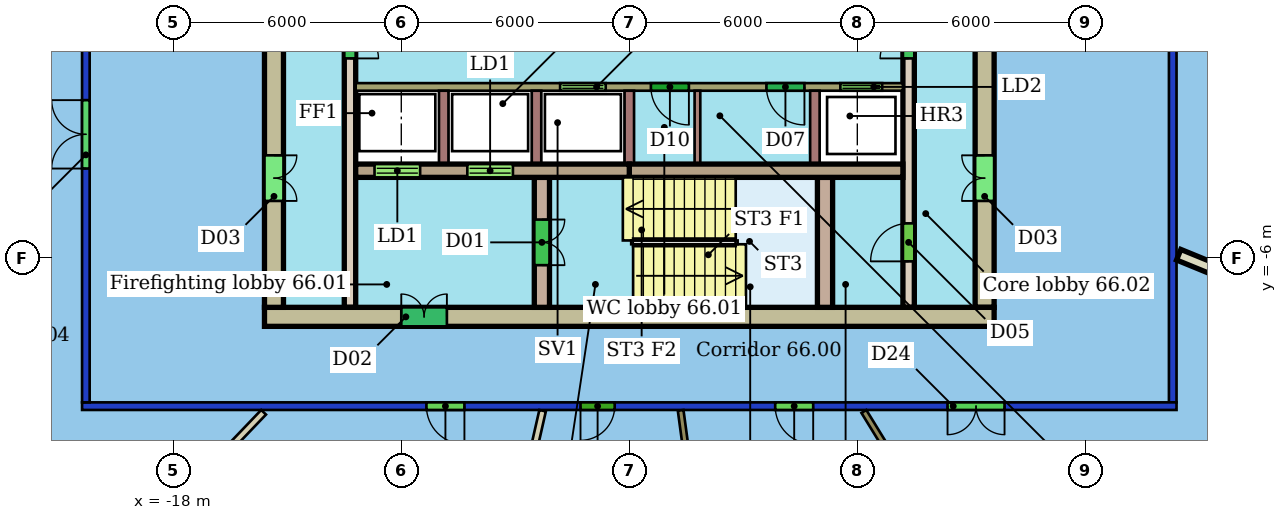
"""IFC4 building model, lengths in metres.
Left out: names, types, materials, properties, quantities, classifications, styles, units other than length and angle.
Written with IfcOpenShell. Run it as: python <this file> out.ifc"""

import sys

from ifc_helpers import new_model, si_unit, direction, frame, frame_2d, origin, place, context, subcontext, project, spatial, rectangle, extrude, element, fill, save


model = new_model("IFC4")
c1 = context("Model", 3, precision=1e-05, world=origin(), true_north=direction((0.0, 1.0)))
c2 = subcontext(c1, "Body", "Model", "MODEL_VIEW")
j1 = project(units=[si_unit("LENGTHUNIT", "METRE"), si_unit("PLANEANGLEUNIT", "RADIAN")], contexts=[c1])
p1 = place(None, origin())
s1 = spatial("IfcSite", under=j1, at=p1, CompositionType="ELEMENT")
p2 = place(p1, origin())
s2 = spatial("IfcBuilding", under=s1, at=p2, CompositionType="ELEMENT")
p3 = place(p2, frame((0.0, 0.0, 268.5)))
s3 = spatial("IfcBuildingStorey", under=s2, at=p3, CompositionType="ELEMENT", Elevation=268.5)
p4 = place(p3, frame((8.4, -9.9, 0.0), z_axis=(0.0, 0.0, 1.0), x_axis=(-1.0, 0.0, 0.0)))
e1 = element("IfcWall", 1, at=p4, inside=s3, PredefinedType="PARTITIONING", context=c2, shape_type="SweptSolid", body=[
    extrude(rectangle(XDim=28.8, YDim=0.2, at=frame_2d((14.4, 0.0))), origin(), (0.0, 0.0, 1.0), 3.1),
])
p5 = place(p4, frame((18.739, 0.0, 0.0)))
e2 = element("IfcOpeningElement", 2, at=p5, cuts=e1, PredefinedType="OPENING", context=c2, shape_type="SweptSolid", body=[
    extrude(rectangle(XDim=1.0, YDim=2.1, at=frame_2d((0.5, 1.05))), frame((0.0, 0.11, 0.0), z_axis=(0.0, -1.0, 0.0), x_axis=(1.0, 0.0, 0.0)), (0.0, 0.0, 1.0), 0.22),
])
p6 = place(p4, frame((14.784, 0.0, 0.0)))
e3 = element("IfcOpeningElement", 3, at=p6, cuts=e1, PredefinedType="OPENING", context=c2, shape_type="SweptSolid", body=[
    extrude(rectangle(XDim=0.9, YDim=2.1, at=frame_2d((0.45, 1.05))), frame((0.0, 0.11, 0.0), z_axis=(0.0, -1.0, 0.0), x_axis=(1.0, 0.0, 0.0)), (0.0, 0.0, 1.0), 0.22),
])
p7 = place(p4, frame((9.561, 0.0, 0.0)))
e4 = element("IfcOpeningElement", 4, at=p7, cuts=e1, PredefinedType="OPENING", context=c2, shape_type="SweptSolid", body=[
    extrude(rectangle(XDim=1.0, YDim=2.1, at=frame_2d((0.5, 1.05))), frame((0.0, 0.11, 0.0), z_axis=(0.0, -1.0, 0.0), x_axis=(1.0, 0.0, 0.0)), (0.0, 0.0, 1.0), 0.22),
])
p8 = place(p4, frame((4.526, 0.0, 0.0)))
e5 = element("IfcOpeningElement", 5, at=p8, cuts=e1, PredefinedType="OPENING", context=c2, shape_type="SweptSolid", body=[
    extrude(rectangle(XDim=1.5, YDim=2.1, at=frame_2d((0.75, 1.05))), frame((0.0, 0.11, 0.0), z_axis=(0.0, -1.0, 0.0), x_axis=(1.0, 0.0, 0.0)), (0.0, 0.0, 1.0), 0.22),
])
p9 = place(p3, frame((-20.3, -9.8, 0.0), z_axis=(0.0, 0.0, 1.0), x_axis=(0.0, 1.0, 0.0)))
e6 = element("IfcWall", 6, at=p9, inside=s3, PredefinedType="PARTITIONING", context=c2, shape_type="SweptSolid", body=[
    extrude(rectangle(XDim=19.6, YDim=0.2, at=frame_2d((9.8, 0.0))), origin(), (0.0, 0.0, 1.0), 3.1),
])
p10 = place(p9, frame((13.312, 0.0, 0.0)))
e7 = element("IfcOpeningElement", 7, at=p10, cuts=e6, PredefinedType="OPENING", context=c2, shape_type="SweptSolid", body=[
    extrude(rectangle(XDim=1.5, YDim=2.4, at=frame_2d((0.75, 1.2))), frame((0.0, 0.11, 0.0), z_axis=(0.0, -1.0, 0.0), x_axis=(1.0, 0.0, 0.0)), (0.0, 0.0, 1.0), 0.22),
])
p11 = place(p9, frame((6.152, 0.0, 0.0)))
e8 = element("IfcOpeningElement", 8, at=p11, cuts=e6, PredefinedType="OPENING", context=c2, shape_type="SweptSolid", body=[
    extrude(rectangle(XDim=1.8, YDim=2.1, at=frame_2d((0.9, 1.05))), frame((0.0, 0.11, 0.0), z_axis=(0.0, -1.0, 0.0), x_axis=(1.0, 0.0, 0.0)), (0.0, 0.0, 1.0), 0.22),
])
p12 = place(p3, frame((8.3, 9.8, 0.0), z_axis=(0.0, 0.0, 1.0), x_axis=(0.0, -1.0, 0.0)))
e9 = element("IfcWall", 9, at=p12, inside=s3, PredefinedType="PARTITIONING", context=c2, shape_type="SweptSolid", body=[
    extrude(rectangle(XDim=19.6, YDim=0.2, at=frame_2d((9.8, 0.0))), origin(), (0.0, 0.0, 1.0), 3.1),
])
p13 = place(p12, frame((7.671, 0.0, 0.0)))
e10 = element("IfcOpeningElement", 10, at=p13, cuts=e9, PredefinedType="OPENING", context=c2, shape_type="SweptSolid", body=[
    extrude(rectangle(XDim=1.8, YDim=2.4, at=frame_2d((0.9, 1.2))), frame((0.0, 0.11, 0.0), z_axis=(0.0, -1.0, 0.0), x_axis=(1.0, 0.0, 0.0)), (0.0, 0.0, 1.0), 0.22),
])
p14 = place(p12, frame((2.344, 0.0, 0.0)))
e11 = element("IfcOpeningElement", 11, at=p14, cuts=e9, PredefinedType="OPENING", context=c2, shape_type="SweptSolid", body=[
    extrude(rectangle(XDim=1.0, YDim=2.4, at=frame_2d((0.5, 1.2))), frame((0.0, 0.11, 0.0), z_axis=(0.0, -1.0, 0.0), x_axis=(1.0, 0.0, 0.0)), (0.0, 0.0, 1.0), 0.22),
])
p15 = place(p3, frame((-23.423, -18.215, 0.0), z_axis=(0.0, 0.0, 1.0), x_axis=(0.691235418305, 0.722629639913, 0.0)))
e12 = element("IfcWall", 12, at=p15, inside=s3, PredefinedType="PARTITIONING", context=c2, shape_type="SweptSolid", body=[
    extrude(rectangle(XDim=11.284, YDim=0.175, at=frame_2d((5.642, 0.0))), origin(), (0.0, 0.0, 1.0), 3.45),
])
p16 = place(p3, frame((-11.521, -24.243, 0.0), z_axis=(0.0, 0.0, 1.0), x_axis=(0.222039917011, 0.975037576329, 0.0)))
e13 = element("IfcWall", 13, at=p16, inside=s3, PredefinedType="PARTITIONING", context=c2, shape_type="SweptSolid", body=[
    extrude(rectangle(XDim=14.588, YDim=0.175, at=frame_2d((7.294, 0.0))), origin(), (0.0, 0.0, 1.0), 3.45),
])
p17 = place(p3, frame((-2.887, -23.066, 0.0), z_axis=(0.0, 0.0, 1.0), x_axis=(-0.133760987358, 0.991013621632, 0.0)))
e14 = element("IfcWall", 14, at=p17, inside=s3, PredefinedType="PARTITIONING", context=c2, shape_type="SweptSolid", body=[
    extrude(rectangle(XDim=13.174, YDim=0.15, at=frame_2d((6.587, 0.0))), origin(), (0.0, 0.0, 1.0), 3.45),
])
p18 = place(p3, frame((5.294, -18.369, 0.0), z_axis=(0.0, 0.0, 1.0), x_axis=(-0.523770006644, 0.851859718581, 0.0)))
e15 = element("IfcWall", 15, at=p18, inside=s3, PredefinedType="PARTITIONING", context=c2, shape_type="SweptSolid", body=[
    extrude(rectangle(XDim=9.778, YDim=0.15, at=frame_2d((4.889, 0.0))), origin(), (0.0, 0.0, 1.0), 3.45),
])
p19 = place(p3, frame((13.344, -7.915, 0.0), z_axis=(0.0, 0.0, 1.0), x_axis=(-0.925520438103, 0.378697661274, 0.0)))
e16 = element("IfcWall", 16, at=p19, inside=s3, PredefinedType="PARTITIONING", context=c2, shape_type="SweptSolid", body=[
    extrude(rectangle(XDim=5.28, YDim=0.3, at=frame_2d((2.64, 0.0))), origin(), (0.0, 0.0, 1.0), 3.45),
])
p20 = place(p3, frame((-15.6, -7.55, 0.0), z_axis=(0.0, 0.0, 1.0), x_axis=(1.0, 0.0, 0.0)))
e17 = element("IfcWall", 17, at=p20, inside=s3, PredefinedType="SHEAR", context=c2, shape_type="SweptSolid", body=[
    extrude(rectangle(XDim=19.2, YDim=0.5, at=frame_2d((9.6, 0.0))), origin(), (0.0, 0.0, 1.0), 3.3),
])
p21 = place(p20, frame((3.6, 0.0, 0.0)))
e18 = element("IfcOpeningElement", 18, at=p21, cuts=e17, PredefinedType="OPENING", context=c2, shape_type="SweptSolid", body=[
    extrude(rectangle(XDim=1.2, YDim=2.1, at=frame_2d((0.6, 1.05))), frame((0.0, 0.26, 0.0), z_axis=(0.0, -1.0, 0.0), x_axis=(1.0, 0.0, 0.0)), (0.0, 0.0, 1.0), 0.52),
])
p22 = place(p3, frame((-15.35, 7.3, 0.0), z_axis=(0.0, 0.0, 1.0), x_axis=(0.0, -1.0, 0.0)))
e19 = element("IfcWall", 19, at=p22, inside=s3, PredefinedType="SHEAR", context=c2, shape_type="SweptSolid", body=[
    extrude(rectangle(XDim=14.6, YDim=0.5, at=frame_2d((7.3, 0.0))), origin(), (0.0, 0.0, 1.0), 3.3),
])
p23 = place(p22, frame((10.6, 0.0, 0.0)))
e20 = element("IfcOpeningElement", 20, at=p23, cuts=e19, PredefinedType="OPENING", context=c2, shape_type="SweptSolid", body=[
    extrude(rectangle(XDim=1.2, YDim=2.1, at=frame_2d((0.6, 1.05))), frame((0.0, 0.26, 0.0), z_axis=(0.0, -1.0, 0.0), x_axis=(1.0, 0.0, 0.0)), (0.0, 0.0, 1.0), 0.52),
])
p24 = place(p22, frame((2.8, 0.0, 0.0)))
e21 = element("IfcOpeningElement", 21, at=p24, cuts=e19, PredefinedType="OPENING", context=c2, shape_type="SweptSolid", body=[
    extrude(rectangle(XDim=1.2, YDim=2.1, at=frame_2d((0.6, 1.05))), frame((0.0, 0.26, 0.0), z_axis=(0.0, -1.0, 0.0), x_axis=(1.0, 0.0, 0.0)), (0.0, 0.0, 1.0), 0.52),
])
p25 = place(p3, frame((3.35, -7.3, 0.0), z_axis=(0.0, 0.0, 1.0), x_axis=(0.0, 1.0, 0.0)))
e22 = element("IfcWall", 22, at=p25, inside=s3, PredefinedType="SHEAR", context=c2, shape_type="SweptSolid", body=[
    extrude(rectangle(XDim=14.6, YDim=0.5, at=frame_2d((7.3, 0.0))), origin(), (0.0, 0.0, 1.0), 3.3),
])
p26 = place(p25, frame((2.8, 0.0, 0.0)))
e23 = element("IfcOpeningElement", 23, at=p26, cuts=e22, PredefinedType="OPENING", context=c2, shape_type="SweptSolid", body=[
    extrude(rectangle(XDim=1.2, YDim=2.1, at=frame_2d((0.6, 1.05))), frame((0.0, 0.26, 0.0), z_axis=(0.0, -1.0, 0.0), x_axis=(1.0, 0.0, 0.0)), (0.0, 0.0, 1.0), 0.52),
])
p27 = place(p25, frame((10.6, 0.0, 0.0)))
e24 = element("IfcOpeningElement", 24, at=p27, cuts=e22, PredefinedType="OPENING", context=c2, shape_type="SweptSolid", body=[
    extrude(rectangle(XDim=1.2, YDim=2.1, at=frame_2d((0.6, 1.05))), frame((0.0, 0.26, 0.0), z_axis=(0.0, -1.0, 0.0), x_axis=(1.0, 0.0, 0.0)), (0.0, 0.0, 1.0), 0.52),
])
p28 = place(p3, frame((-13.2, -3.705, 0.0), z_axis=(0.0, 0.0, 1.0), x_axis=(1.0, 0.0, 0.0)))
e25 = element("IfcWall", 25, at=p28, inside=s3, PredefinedType="SHEAR", context=c2, shape_type="SweptSolid", body=[
    extrude(rectangle(XDim=7.2, YDim=0.35, at=frame_2d((3.6, 0.0))), origin(), (0.0, 0.0, 1.0), 3.3),
])
p29 = place(p28, frame((0.496, 0.0, 0.0)))
e26 = element("IfcOpeningElement", 26, at=p29, cuts=e25, PredefinedType="OPENING", context=c2, shape_type="SweptSolid", body=[
    extrude(rectangle(XDim=1.2, YDim=2.1, at=frame_2d((0.6, 1.05))), frame((0.0, 0.185, 0.0), z_axis=(0.0, -1.0, 0.0), x_axis=(1.0, 0.0, 0.0)), (0.0, 0.0, 1.0), 0.37),
])
p30 = place(p28, frame((2.938, 0.0, 0.0)))
e27 = element("IfcOpeningElement", 27, at=p30, cuts=e25, PredefinedType="OPENING", context=c2, shape_type="SweptSolid", body=[
    extrude(rectangle(XDim=1.2, YDim=2.1, at=frame_2d((0.6, 1.05))), frame((0.0, 0.185, 0.0), z_axis=(0.0, -1.0, 0.0), x_axis=(1.0, 0.0, 0.0)), (0.0, 0.0, 1.0), 0.37),
])
p31 = place(p3, frame((-6.0, -3.705, 0.0), z_axis=(0.0, 0.0, 1.0), x_axis=(1.0, 0.0, 0.0)))
e28 = element("IfcWall", 28, at=p31, inside=s3, PredefinedType="SHEAR", context=c2, shape_type="SweptSolid", body=[
    extrude(rectangle(XDim=7.2, YDim=0.35, at=frame_2d((3.6, 0.0))), origin(), (0.0, 0.0, 1.0), 3.3),
])
p32 = place(p3, frame((-13.35, 7.3, 0.0), z_axis=(0.0, 0.0, 1.0), x_axis=(0.0, -1.0, 0.0)))
e29 = element("IfcWall", 29, at=p32, inside=s3, PredefinedType="SHEAR", context=c2, shape_type="SweptSolid", body=[
    extrude(rectangle(XDim=14.6, YDim=0.3, at=frame_2d((7.3, 0.0))), origin(), (0.0, 0.0, 1.0), 3.3),
])
p33 = place(p32, frame((6.55, 0.0, 0.0)))
e30 = element("IfcOpeningElement", 30, at=p33, cuts=e29, PredefinedType="OPENING", context=c2, shape_type="SweptSolid", body=[
    extrude(rectangle(XDim=1.5, YDim=2.1, at=frame_2d((0.75, 1.05))), frame((0.0, 0.16, 0.0), z_axis=(0.0, -1.0, 0.0), x_axis=(1.0, 0.0, 0.0)), (0.0, 0.0, 1.0), 0.32),
])
p34 = place(p3, frame((1.35, -7.3, 0.0), z_axis=(0.0, 0.0, 1.0), x_axis=(0.0, 1.0, 0.0)))
e31 = element("IfcWall", 31, at=p34, inside=s3, PredefinedType="SHEAR", context=c2, shape_type="SweptSolid", body=[
    extrude(rectangle(XDim=14.6, YDim=0.3, at=frame_2d((7.3, 0.0))), origin(), (0.0, 0.0, 1.0), 3.3),
])
p35 = place(p34, frame((1.21, 0.0, 0.0)))
e32 = element("IfcOpeningElement", 32, at=p35, cuts=e31, PredefinedType="OPENING", context=c2, shape_type="SweptSolid", body=[
    extrude(rectangle(XDim=1.0, YDim=2.1, at=frame_2d((0.5, 1.05))), frame((0.0, 0.16, 0.0), z_axis=(0.0, -1.0, 0.0), x_axis=(1.0, 0.0, 0.0)), (0.0, 0.0, 1.0), 0.32),
])
p36 = place(p34, frame((6.55, 0.0, 0.0)))
e33 = element("IfcOpeningElement", 33, at=p36, cuts=e31, PredefinedType="OPENING", context=c2, shape_type="SweptSolid", body=[
    extrude(rectangle(XDim=1.5, YDim=2.1, at=frame_2d((0.75, 1.05))), frame((0.0, 0.16, 0.0), z_axis=(0.0, -1.0, 0.0), x_axis=(1.0, 0.0, 0.0)), (0.0, 0.0, 1.0), 0.32),
])
p37 = place(p3, frame((1.2, -1.5, 0.0), z_axis=(0.0, 0.0, 1.0), x_axis=(-1.0, 0.0, 0.0)))
e34 = element("IfcWall", 34, at=p37, inside=s3, PredefinedType="SHEAR", context=c2, shape_type="SweptSolid", body=[
    extrude(rectangle(XDim=14.4, YDim=0.2, at=frame_2d((7.2, 0.0))), origin(), (0.0, 0.0, 1.0), 3.3),
])
p38 = place(p37, frame((7.821, 0.0, 0.0)))
e35 = element("IfcOpeningElement", 35, at=p38, cuts=e34, PredefinedType="OPENING", context=c2, shape_type="SweptSolid", body=[
    extrude(rectangle(XDim=1.2, YDim=2.1, at=frame_2d((0.6, 1.05))), frame((0.0, 0.11, 0.0), z_axis=(0.0, -1.0, 0.0), x_axis=(1.0, 0.0, 0.0)), (0.0, 0.0, 1.0), 0.22),
])
p39 = place(p37, frame((0.546, 0.0, 0.0)))
e36 = element("IfcOpeningElement", 36, at=p39, cuts=e34, PredefinedType="OPENING", context=c2, shape_type="SweptSolid", body=[
    extrude(rectangle(XDim=1.1, YDim=2.1, at=frame_2d((0.55, 1.05))), frame((0.0, 0.11, 0.0), z_axis=(0.0, -1.0, 0.0), x_axis=(1.0, 0.0, 0.0)), (0.0, 0.0, 1.0), 0.22),
])
p40 = place(p37, frame((5.632, 0.0, 0.0)))
e37 = element("IfcOpeningElement", 37, at=p40, cuts=e34, PredefinedType="OPENING", context=c2, shape_type="SweptSolid", body=[
    extrude(rectangle(XDim=1.0, YDim=2.1, at=frame_2d((0.5, 1.05))), frame((0.0, 0.11, 0.0), z_axis=(0.0, -1.0, 0.0), x_axis=(1.0, 0.0, 0.0)), (0.0, 0.0, 1.0), 0.22),
])
p41 = place(p37, frame((2.592, 0.0, 0.0)))
e38 = element("IfcOpeningElement", 38, at=p41, cuts=e34, PredefinedType="OPENING", context=c2, shape_type="SweptSolid", body=[
    extrude(rectangle(XDim=1.0, YDim=2.1, at=frame_2d((0.5, 1.05))), frame((0.0, 0.11, 0.0), z_axis=(0.0, -1.0, 0.0), x_axis=(1.0, 0.0, 0.0)), (0.0, 0.0, 1.0), 0.22),
])
p42 = place(p3, frame((-8.3, -3.88, 0.0), z_axis=(0.0, 0.0, 1.0), x_axis=(0.0, -1.0, 0.0)))
e39 = element("IfcWall", 39, at=p42, inside=s3, PredefinedType="SHEAR", context=c2, shape_type="SweptSolid", body=[
    extrude(rectangle(XDim=3.42, YDim=0.4, at=frame_2d((1.71, 0.0))), origin(), (0.0, 0.0, 1.0), 3.3),
])
p43 = place(p42, frame((1.11, 0.0, 0.0)))
e40 = element("IfcOpeningElement", 40, at=p43, cuts=e39, PredefinedType="OPENING", context=c2, shape_type="SweptSolid", body=[
    extrude(rectangle(XDim=1.2, YDim=2.1, at=frame_2d((0.6, 1.05))), frame((0.0, 0.21, 0.0), z_axis=(0.0, -1.0, 0.0), x_axis=(1.0, 0.0, 0.0)), (0.0, 0.0, 1.0), 0.42),
])
p44 = place(p3, frame((-0.85, -3.88, 0.0), z_axis=(0.0, 0.0, 1.0), x_axis=(0.0, -1.0, 0.0)))
e41 = element("IfcWall", 41, at=p44, inside=s3, PredefinedType="SHEAR", context=c2, shape_type="SweptSolid", body=[
    extrude(rectangle(XDim=3.42, YDim=0.4, at=frame_2d((1.71, 0.0))), origin(), (0.0, 0.0, 1.0), 3.3),
])
for number, where, z_axis, x_axis in (
    (42, (-10.883, -1.6, 0.0), (0.0, 0.0, 1.0), (0.0, -1.0, 0.0)),
    (43, (-8.442, -1.6, 0.0), (0.0, 0.0, 1.0), (0.0, -1.0, 0.0)),
    (44, (-6.0, -1.6, 0.0), (0.0, 0.0, 1.0), (0.0, -1.0, 0.0)),
    (45, (-1.117, -1.6, 0.0), (0.0, 0.0, 1.0), (0.0, -1.0, 0.0)),
):
    element("IfcWall", number, at=place(p3, frame(where, z_axis=z_axis, x_axis=x_axis)), inside=s3, PredefinedType="SHEAR", context=c2, shape_type="SweptSolid", body=[
        extrude(rectangle(XDim=1.93, YDim=0.25, at=frame_2d((0.965, 0.0))), origin(), (0.0, 0.0, 1.0), 3.3),
    ])
p45 = place(p3, frame((-4.207, -1.6, 0.0), z_axis=(0.0, 0.0, 1.0), x_axis=(0.0, -1.0, 0.0)))
e46 = element("IfcWall", 46, at=p45, inside=s3, PredefinedType="PARTITIONING", context=c2, shape_type="SweptSolid", body=[
    extrude(rectangle(XDim=1.93, YDim=0.15, at=frame_2d((0.965, 0.0))), origin(), (0.0, 0.0, 1.0), 3.3),
])
p46 = place(p11, origin())
e47 = element("IfcDoor", 47, at=p46, inside=s3, OperationType="DOUBLE_DOOR_SINGLE_SWING", PredefinedType="DOOR", context=c2, shape_type="SweptSolid", body=[
    extrude(rectangle(XDim=1.8, YDim=2.1, at=frame_2d((0.9, 1.05))), frame((0.0, 0.025, 0.0), z_axis=(0.0, -1.0, 0.0), x_axis=(1.0, 0.0, 0.0)), (0.0, 0.0, 1.0), 0.05),
])
fill(e8, e47)
p47 = place(p5, origin())
e48 = element("IfcDoor", 48, at=p47, inside=s3, OperationType="SINGLE_SWING_LEFT", PredefinedType="DOOR", context=c2, shape_type="SweptSolid", body=[
    extrude(rectangle(XDim=1.0, YDim=2.1, at=frame_2d((0.5, 1.05))), frame((0.0, 0.025, 0.0), z_axis=(0.0, -1.0, 0.0), x_axis=(1.0, 0.0, 0.0)), (0.0, 0.0, 1.0), 0.05),
])
fill(e2, e48)
p48 = place(p6, origin())
e49 = element("IfcDoor", 49, at=p48, inside=s3, OperationType="SINGLE_SWING_RIGHT", PredefinedType="DOOR", context=c2, shape_type="SweptSolid", body=[
    extrude(rectangle(XDim=0.9, YDim=2.1, at=frame_2d((0.45, 1.05))), frame((0.0, 0.025, 0.0), z_axis=(0.0, -1.0, 0.0), x_axis=(1.0, 0.0, 0.0)), (0.0, 0.0, 1.0), 0.05),
])
fill(e3, e49)
p49 = place(p7, origin())
e50 = element("IfcDoor", 50, at=p49, inside=s3, OperationType="SINGLE_SWING_LEFT", PredefinedType="DOOR", context=c2, shape_type="SweptSolid", body=[
    extrude(rectangle(XDim=1.0, YDim=2.1, at=frame_2d((0.5, 1.05))), frame((0.0, 0.025, 0.0), z_axis=(0.0, -1.0, 0.0), x_axis=(1.0, 0.0, 0.0)), (0.0, 0.0, 1.0), 0.05),
])
fill(e4, e50)
p50 = place(p8, origin())
e51 = element("IfcDoor", 51, at=p50, inside=s3, OperationType="DOUBLE_DOOR_SINGLE_SWING", PredefinedType="DOOR", context=c2, shape_type="SweptSolid", body=[
    extrude(rectangle(XDim=1.5, YDim=2.1, at=frame_2d((0.75, 1.05))), frame((0.0, 0.025, 0.0), z_axis=(0.0, -1.0, 0.0), x_axis=(1.0, 0.0, 0.0)), (0.0, 0.0, 1.0), 0.05),
])
fill(e5, e51)
p51 = place(p21, origin())
e52 = element("IfcDoor", 52, at=p51, inside=s3, OperationType="DOUBLE_DOOR_SINGLE_SWING", PredefinedType="NOTDEFINED", context=c2, shape_type="SweptSolid", body=[
    extrude(rectangle(XDim=1.2, YDim=2.1, at=frame_2d((0.6, 1.05))), frame((0.0, 0.025, 0.0), z_axis=(0.0, -1.0, 0.0), x_axis=(1.0, 0.0, 0.0)), (0.0, 0.0, 1.0), 0.05),
])
fill(e18, e52)
p52 = place(p23, origin())
e53 = element("IfcDoor", 53, at=p52, inside=s3, OperationType="DOUBLE_DOOR_SINGLE_SWING", PredefinedType="NOTDEFINED", context=c2, shape_type="SweptSolid", body=[
    extrude(rectangle(XDim=1.2, YDim=2.1, at=frame_2d((0.6, 1.05))), frame((0.0, 0.025, 0.0), z_axis=(0.0, -1.0, 0.0), x_axis=(1.0, 0.0, 0.0)), (0.0, 0.0, 1.0), 0.05),
])
fill(e20, e53)
p53 = place(p26, origin())
e54 = element("IfcDoor", 54, at=p53, inside=s3, OperationType="DOUBLE_DOOR_SINGLE_SWING", PredefinedType="NOTDEFINED", context=c2, shape_type="SweptSolid", body=[
    extrude(rectangle(XDim=1.2, YDim=2.1, at=frame_2d((0.6, 1.05))), frame((0.0, 0.025, 0.0), z_axis=(0.0, -1.0, 0.0), x_axis=(1.0, 0.0, 0.0)), (0.0, 0.0, 1.0), 0.05),
])
fill(e23, e54)
p54 = place(p29, origin())
e55 = element("IfcDoor", 55, at=p54, inside=s3, OperationType="DOUBLE_DOOR_SLIDING", PredefinedType="NOTDEFINED", context=c2, shape_type="SweptSolid", body=[
    extrude(rectangle(XDim=1.2, YDim=2.1, at=frame_2d((0.6, 1.05))), frame((0.0, 0.025, 0.0), z_axis=(0.0, -1.0, 0.0), x_axis=(1.0, 0.0, 0.0)), (0.0, 0.0, 1.0), 0.05),
])
fill(e26, e55)
p55 = place(p30, origin())
e56 = element("IfcDoor", 56, at=p55, inside=s3, OperationType="DOUBLE_DOOR_SLIDING", PredefinedType="NOTDEFINED", context=c2, shape_type="SweptSolid", body=[
    extrude(rectangle(XDim=1.2, YDim=2.1, at=frame_2d((0.6, 1.05))), frame((0.0, 0.025, 0.0), z_axis=(0.0, -1.0, 0.0), x_axis=(1.0, 0.0, 0.0)), (0.0, 0.0, 1.0), 0.05),
])
fill(e27, e56)
p56 = place(p33, origin())
e57 = element("IfcDoor", 57, at=p56, inside=s3, OperationType="DOUBLE_DOOR_SINGLE_SWING", PredefinedType="NOTDEFINED", context=c2, shape_type="SweptSolid", body=[
    extrude(rectangle(XDim=1.5, YDim=2.1, at=frame_2d((0.75, 1.05))), frame((0.0, 0.025, 0.0), z_axis=(0.0, -1.0, 0.0), x_axis=(1.0, 0.0, 0.0)), (0.0, 0.0, 1.0), 0.05),
])
fill(e30, e57)
p57 = place(p35, origin())
e58 = element("IfcDoor", 58, at=p57, inside=s3, OperationType="SINGLE_SWING_LEFT", PredefinedType="NOTDEFINED", context=c2, shape_type="SweptSolid", body=[
    extrude(rectangle(XDim=1.0, YDim=2.1, at=frame_2d((0.5, 1.05))), frame((0.0, 0.025, 0.0), z_axis=(0.0, -1.0, 0.0), x_axis=(1.0, 0.0, 0.0)), (0.0, 0.0, 1.0), 0.05),
])
fill(e32, e58)
p58 = place(p36, origin())
e59 = element("IfcDoor", 59, at=p58, inside=s3, OperationType="DOUBLE_DOOR_SINGLE_SWING", PredefinedType="NOTDEFINED", context=c2, shape_type="SweptSolid", body=[
    extrude(rectangle(XDim=1.5, YDim=2.1, at=frame_2d((0.75, 1.05))), frame((0.0, 0.025, 0.0), z_axis=(0.0, -1.0, 0.0), x_axis=(1.0, 0.0, 0.0)), (0.0, 0.0, 1.0), 0.05),
])
fill(e33, e59)
p59 = place(p38, origin())
e60 = element("IfcDoor", 60, at=p59, inside=s3, OperationType="DOUBLE_DOOR_SLIDING", PredefinedType="NOTDEFINED", context=c2, shape_type="SweptSolid", body=[
    extrude(rectangle(XDim=1.2, YDim=2.1, at=frame_2d((0.6, 1.05))), frame((0.0, 0.025, 0.0), z_axis=(0.0, -1.0, 0.0), x_axis=(1.0, 0.0, 0.0)), (0.0, 0.0, 1.0), 0.05),
])
fill(e35, e60)
p60 = place(p39, origin())
e61 = element("IfcDoor", 61, at=p60, inside=s3, OperationType="DOUBLE_DOOR_SLIDING", PredefinedType="NOTDEFINED", context=c2, shape_type="SweptSolid", body=[
    extrude(rectangle(XDim=1.1, YDim=2.1, at=frame_2d((0.55, 1.05))), frame((0.0, 0.025, 0.0), z_axis=(0.0, -1.0, 0.0), x_axis=(1.0, 0.0, 0.0)), (0.0, 0.0, 1.0), 0.05),
])
fill(e36, e61)
p61 = place(p40, origin())
e62 = element("IfcDoor", 62, at=p61, inside=s3, OperationType="SINGLE_SWING_LEFT", PredefinedType="NOTDEFINED", context=c2, shape_type="SweptSolid", body=[
    extrude(rectangle(XDim=1.0, YDim=2.1, at=frame_2d((0.5, 1.05))), frame((0.0, 0.025, 0.0), z_axis=(0.0, -1.0, 0.0), x_axis=(1.0, 0.0, 0.0)), (0.0, 0.0, 1.0), 0.05),
])
fill(e37, e62)
p62 = place(p41, origin())
e63 = element("IfcDoor", 63, at=p62, inside=s3, OperationType="SINGLE_SWING_LEFT", PredefinedType="NOTDEFINED", context=c2, shape_type="SweptSolid", body=[
    extrude(rectangle(XDim=1.0, YDim=2.1, at=frame_2d((0.5, 1.05))), frame((0.0, 0.025, 0.0), z_axis=(0.0, -1.0, 0.0), x_axis=(1.0, 0.0, 0.0)), (0.0, 0.0, 1.0), 0.05),
])
fill(e38, e63)
p63 = place(p43, origin())
e64 = element("IfcDoor", 64, at=p63, inside=s3, OperationType="DOUBLE_DOOR_SINGLE_SWING", PredefinedType="NOTDEFINED", context=c2, shape_type="SweptSolid", body=[
    extrude(rectangle(XDim=1.2, YDim=2.1, at=frame_2d((0.6, 1.05))), frame((0.0, 0.025, 0.0), z_axis=(0.0, -1.0, 0.0), x_axis=(1.0, 0.0, 0.0)), (0.0, 0.0, 1.0), 0.05),
])
fill(e40, e64)
save(model, sys.argv[1])
